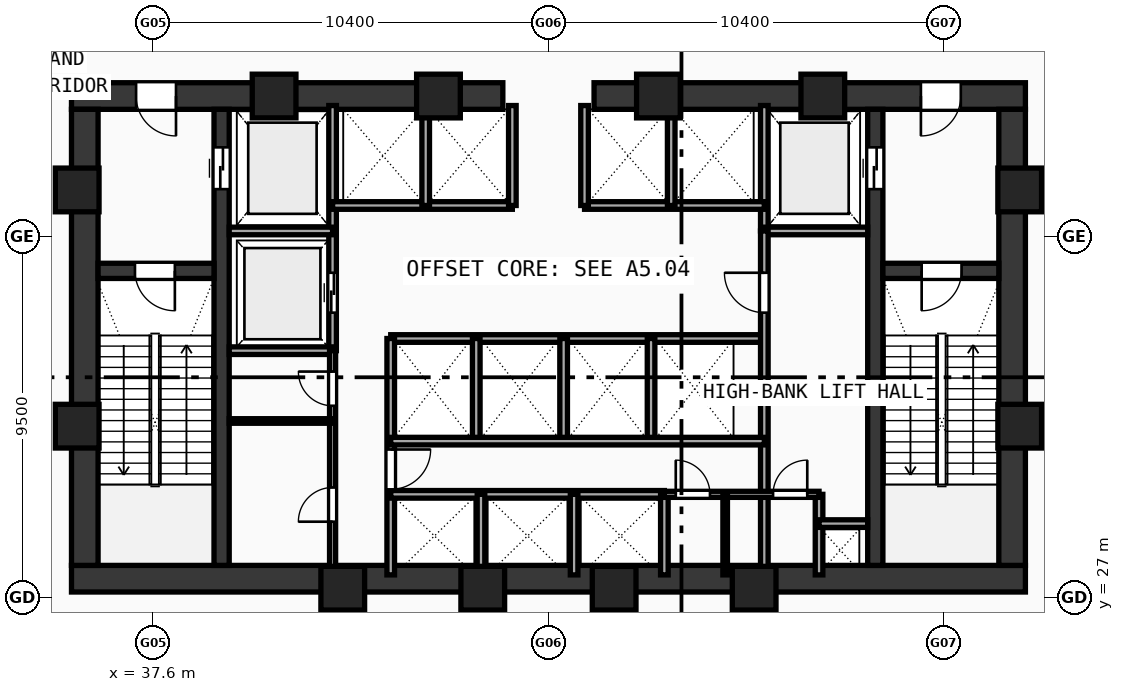
"""IFC4 building model, lengths in metres.
Left out: names, types, materials, properties, quantities, classifications, styles, units other than length and angle.
Written with IfcOpenShell. Run it as: python <this file> out.ifc"""

import sys

from ifc_helpers import new_model, si_unit, direction, frame, frame_2d, origin, origin_with_axes, origin_2d, place, context, subcontext, project, spatial, rectangle, hollow_rectangle, extrude, source, transform, mapped, element, fill, save


model = new_model("IFC4")
c1 = context("Model", 3, precision=1e-05, world=origin(), true_north=direction((0.0, 1.0)))
c2 = subcontext(c1, "Body", "Model", "MODEL_VIEW")
j1 = project(units=[si_unit("LENGTHUNIT", "METRE"), si_unit("PLANEANGLEUNIT", "RADIAN")], contexts=[c1])
p1 = place(None, origin())
s1 = spatial("IfcSite", under=j1, at=p1, CompositionType="ELEMENT")
p2 = place(p1, origin())
s2 = spatial("IfcBuilding", under=s1, at=p2, CompositionType="ELEMENT")
p3 = place(p2, frame((0.0, 0.0, 25.4)))
s3 = spatial("IfcBuildingStorey", under=s2, at=p3, CompositionType="ELEMENT", Elevation=25.4)
p4 = place(p3, frame((35.45, 27.5, 0.0), z_axis=(0.0, 0.0, 1.0), x_axis=(1.0, 0.0, 0.0)))
e1 = element("IfcWall", 1, at=p4, inside=s3, PredefinedType="SHEAR", context=c2, shape_type="SweptSolid", body=[
    extrude(rectangle(XDim=25.1, YDim=0.7, at=frame_2d((12.55, 0.0))), origin(), (0.0, 0.0, 1.0), 4.74),
])
p5 = place(p3, frame((35.45, 40.2, 0.0), z_axis=(0.0, 0.0, 1.0), x_axis=(1.0, 0.0, 0.0)))
e2 = element("IfcWall", 2, at=p5, inside=s3, PredefinedType="SHEAR", context=c2, shape_type="SweptSolid", body=[
    extrude(rectangle(XDim=11.35, YDim=0.7, at=frame_2d((5.675, 0.0))), origin(), (0.0, 0.0, 1.0), 4.74),
])
p6 = place(p5, frame((1.7, 0.0, 0.0)))
e3 = element("IfcOpeningElement", 3, at=p6, cuts=e2, PredefinedType="OPENING", context=c2, shape_type="SweptSolid", body=[
    extrude(rectangle(XDim=1.05, YDim=2.1, at=frame_2d((0.525, 1.05))), frame((0.0, 0.36, 0.0), z_axis=(0.0, -1.0, 0.0), x_axis=(1.0, 0.0, 0.0)), (0.0, 0.0, 1.0), 0.72),
])
p7 = place(p3, frame((49.2, 40.2, 0.0), z_axis=(0.0, 0.0, 1.0), x_axis=(1.0, 0.0, 0.0)))
e4 = element("IfcWall", 4, at=p7, inside=s3, PredefinedType="SHEAR", context=c2, shape_type="SweptSolid", body=[
    extrude(rectangle(XDim=11.35, YDim=0.7, at=frame_2d((5.675, 0.0))), origin(), (0.0, 0.0, 1.0), 4.74),
])
p8 = place(p7, frame((8.6, 0.0, 0.0)))
e5 = element("IfcOpeningElement", 5, at=p8, cuts=e4, PredefinedType="OPENING", context=c2, shape_type="SweptSolid", body=[
    extrude(rectangle(XDim=1.05, YDim=2.1, at=frame_2d((0.525, 1.05))), frame((0.0, 0.36, 0.0), z_axis=(0.0, -1.0, 0.0), x_axis=(1.0, 0.0, 0.0)), (0.0, 0.0, 1.0), 0.72),
])
for number, where, z_axis, x_axis in (
    (6, (35.8, 27.85, 0.0), (0.0, 0.0, 1.0), (0.0, 1.0, 0.0)),
    (7, (60.2, 27.85, 0.0), (0.0, 0.0, 1.0), (0.0, 1.0, 0.0)),
):
    element("IfcWall", number, at=place(p3, frame(where, z_axis=z_axis, x_axis=x_axis)), inside=s3, PredefinedType="SHEAR", context=c2, shape_type="SweptSolid", body=[
        extrude(rectangle(XDim=12.0, YDim=0.7, at=frame_2d((6.0, 0.0))), origin(), (0.0, 0.0, 1.0), 4.74),
    ])
p9 = place(p3, frame((39.4, 27.85, 0.0), z_axis=(0.0, 0.0, 1.0), x_axis=(0.0, 1.0, 0.0)))
e8 = element("IfcWall", 8, at=p9, inside=s3, PredefinedType="SHEAR", context=c2, shape_type="SweptSolid", body=[
    extrude(rectangle(XDim=12.0, YDim=0.4, at=frame_2d((6.0, 0.0))), origin(), (0.0, 0.0, 1.0), 4.74),
])
p10 = place(p9, frame((9.9, 0.0, 0.0)))
e9 = element("IfcOpeningElement", 9, at=p10, cuts=e8, PredefinedType="OPENING", context=c2, shape_type="SweptSolid", body=[
    extrude(rectangle(XDim=1.1, YDim=2.1, at=frame_2d((0.55, 1.05))), frame((0.0, 0.21, 0.0), z_axis=(0.0, -1.0, 0.0), x_axis=(1.0, 0.0, 0.0)), (0.0, 0.0, 1.0), 0.42),
])
p11 = place(p3, frame((56.6, 27.85, 0.0), z_axis=(0.0, 0.0, 1.0), x_axis=(0.0, 1.0, 0.0)))
e10 = element("IfcWall", 10, at=p11, inside=s3, PredefinedType="SHEAR", context=c2, shape_type="SweptSolid", body=[
    extrude(rectangle(XDim=12.0, YDim=0.4, at=frame_2d((6.0, 0.0))), origin(), (0.0, 0.0, 1.0), 4.74),
])
p12 = place(p11, frame((9.9, 0.0, 0.0)))
e11 = element("IfcOpeningElement", 11, at=p12, cuts=e10, PredefinedType="OPENING", context=c2, shape_type="SweptSolid", body=[
    extrude(rectangle(XDim=1.1, YDim=2.1, at=frame_2d((0.55, 1.05))), frame((0.0, 0.21, 0.0), z_axis=(0.0, -1.0, 0.0), x_axis=(1.0, 0.0, 0.0)), (0.0, 0.0, 1.0), 0.42),
])
p13 = place(p3, frame((36.15, 35.6, 0.0), z_axis=(0.0, 0.0, 1.0), x_axis=(1.0, 0.0, 0.0)))
e12 = element("IfcWall", 12, at=p13, inside=s3, PredefinedType="SHEAR", context=c2, shape_type="SweptSolid", body=[
    extrude(rectangle(XDim=3.05, YDim=0.4, at=frame_2d((1.525, 0.0))), origin(), (0.0, 0.0, 1.0), 4.74),
])
p14 = place(p13, frame((0.97, 0.0, 0.0)))
e13 = element("IfcOpeningElement", 13, at=p14, cuts=e12, PredefinedType="OPENING", context=c2, shape_type="SweptSolid", body=[
    extrude(rectangle(XDim=1.05, YDim=2.1, at=frame_2d((0.525, 1.05))), frame((0.0, 0.21, 0.0), z_axis=(0.0, -1.0, 0.0), x_axis=(1.0, 0.0, 0.0)), (0.0, 0.0, 1.0), 0.42),
])
p15 = place(p3, frame((56.8, 35.6, 0.0), z_axis=(0.0, 0.0, 1.0), x_axis=(1.0, 0.0, 0.0)))
e14 = element("IfcWall", 14, at=p15, inside=s3, PredefinedType="SHEAR", context=c2, shape_type="SweptSolid", body=[
    extrude(rectangle(XDim=3.05, YDim=0.4, at=frame_2d((1.525, 0.0))), origin(), (0.0, 0.0, 1.0), 4.74),
])
p16 = place(p15, frame((1.02, 0.0, 0.0)))
e15 = element("IfcOpeningElement", 15, at=p16, cuts=e14, PredefinedType="OPENING", context=c2, shape_type="SweptSolid", body=[
    extrude(rectangle(XDim=1.05, YDim=2.1, at=frame_2d((0.525, 1.05))), frame((0.0, 0.21, 0.0), z_axis=(0.0, -1.0, 0.0), x_axis=(1.0, 0.0, 0.0)), (0.0, 0.0, 1.0), 0.42),
])
m1 = source(origin(), c2, "Body", "SweptSolid", [
    extrude(hollow_rectangle(XDim=1.15, YDim=1.15, WallThickness=0.048, at=origin_2d()), origin(), (0.0, 0.0, 1.0), 5.02),
])
for number, where, z_axis, x_axis in (
    (16, (42.588, 27.25, -0.28), (0.0, 0.0, 1.0), (1.0, 0.0, 0.0)),
    (17, (46.272, 27.25, -0.28), (0.0, 0.0, 1.0), (1.0, 0.0, 0.0)),
    (18, (49.729, 27.25, -0.28), (0.0, 0.0, 1.0), (1.0, 0.0, 0.0)),
    (19, (53.412, 27.25, -0.28), (0.0, 0.0, 1.0), (1.0, 0.0, 0.0)),
    (20, (60.4, 31.513, -0.28), (0.0, 0.0, 1.0), (1.0, 0.0, 0.0)),
    (21, (60.4, 37.729, -0.28), (0.0, 0.0, 1.0), (1.0, 0.0, 0.0)),
    (22, (55.219, 40.2, -0.28), (0.0, 0.0, 1.0), (1.0, 0.0, 0.0)),
    (23, (50.894, 40.2, -0.28), (0.0, 0.0, 1.0), (1.0, 0.0, 0.0)),
    (24, (45.106, 40.2, -0.28), (0.0, 0.0, 1.0), (1.0, 0.0, 0.0)),
    (25, (40.781, 40.2, -0.28), (0.0, 0.0, 1.0), (1.0, 0.0, 0.0)),
    (26, (35.6, 37.729, -0.28), (0.0, 0.0, 1.0), (1.0, 0.0, 0.0)),
    (27, (35.6, 31.513, -0.28), (0.0, 0.0, 1.0), (1.0, 0.0, 0.0)),
):
    element("IfcColumn", number, at=place(p3, frame(where, z_axis=z_axis, x_axis=x_axis)), inside=s3, PredefinedType="COLUMN", context=c2, shape_type="MappedRepresentation", body=[
        mapped(m1, transform((0.0, 0.0, 0.0), scale=1.0)),
    ])
p17 = place(p3, frame((42.32, 33.5, 0.0), z_axis=(0.0, 0.0, 1.0), x_axis=(0.0, 1.0, 0.0)))
e28 = element("IfcWall", 28, at=p17, inside=s3, PredefinedType="SOLIDWALL", context=c2, shape_type="SweptSolid", body=[
    extrude(rectangle(XDim=6.45, YDim=0.2, at=frame_2d((3.225, 0.0))), origin(), (0.0, 0.0, 1.0), 4.74),
])
p18 = place(p17, frame((1.0, 0.0, 0.0)))
e29 = element("IfcOpeningElement", 29, at=p18, cuts=e28, PredefinedType="OPENING", context=c2, shape_type="SweptSolid", body=[
    extrude(rectangle(XDim=1.05, YDim=2.1, at=frame_2d((0.525, 1.05))), frame((0.0, 0.11, 0.0), z_axis=(0.0, -1.0, 0.0), x_axis=(1.0, 0.0, 0.0)), (0.0, 0.0, 1.0), 0.22),
])
for number, where, z_axis, x_axis in (
    (30, (39.6, 36.65, 0.0), (0.0, 0.0, 1.0), (1.0, 0.0, 0.0)),
    (31, (39.6, 33.5, 0.0), (0.0, 0.0, 1.0), (1.0, 0.0, 0.0)),
):
    element("IfcWall", number, at=place(p3, frame(where, z_axis=z_axis, x_axis=x_axis)), inside=s3, PredefinedType="SOLIDWALL", context=c2, shape_type="SweptSolid", body=[
        extrude(rectangle(XDim=2.72, YDim=0.2, at=frame_2d((1.36, 0.0))), origin(), (0.0, 0.0, 1.0), 4.74),
    ])
p19 = place(p3, frame((53.68, 36.65, 0.0), z_axis=(0.0, 0.0, 1.0), x_axis=(0.0, 1.0, 0.0)))
e32 = element("IfcWall", 32, at=p19, inside=s3, PredefinedType="SOLIDWALL", context=c2, shape_type="SweptSolid", body=[
    extrude(rectangle(XDim=3.3, YDim=0.2, at=frame_2d((1.65, 0.0))), origin(), (0.0, 0.0, 1.0), 4.74),
])
p20 = place(p3, frame((53.68, 36.65, 0.0), z_axis=(0.0, 0.0, 1.0), x_axis=(1.0, 0.0, 0.0)))
e33 = element("IfcWall", 33, at=p20, inside=s3, PredefinedType="SOLIDWALL", context=c2, shape_type="SweptSolid", body=[
    extrude(rectangle(XDim=2.72, YDim=0.2, at=frame_2d((1.36, 0.0))), origin(), (0.0, 0.0, 1.0), 4.74),
])
for number, where, z_axis, x_axis in (
    (34, (42.32, 37.32, 0.0), (0.0, 0.0, 1.0), (1.0, 0.0, 0.0)),
    (35, (48.95, 37.32, 0.0), (0.0, 0.0, 1.0), (1.0, 0.0, 0.0)),
):
    element("IfcWall", number, at=place(p3, frame(where, z_axis=z_axis, x_axis=x_axis)), inside=s3, PredefinedType="SOLIDWALL", context=c2, shape_type="SweptSolid", body=[
        extrude(rectangle(XDim=4.73, YDim=0.2, at=frame_2d((2.365, 0.0))), origin(), (0.0, 0.0, 1.0), 4.74),
    ])
for number, where, z_axis, x_axis in (
    (36, (47.05, 37.32, 0.0), (0.0, 0.0, 1.0), (0.0, 1.0, 0.0)),
    (37, (48.95, 37.32, 0.0), (0.0, 0.0, 1.0), (0.0, 1.0, 0.0)),
    (38, (44.77, 37.32, 0.0), (0.0, 0.0, 1.0), (0.0, 1.0, 0.0)),
    (39, (51.23, 37.32, 0.0), (0.0, 0.0, 1.0), (0.0, 1.0, 0.0)),
):
    element("IfcWall", number, at=place(p3, frame(where, z_axis=z_axis, x_axis=x_axis)), inside=s3, PredefinedType="SOLIDWALL", context=c2, shape_type="SweptSolid", body=[
        extrude(rectangle(XDim=2.63, YDim=0.2, at=frame_2d((1.315, 0.0))), origin(), (0.0, 0.0, 1.0), 4.74),
    ])
p21 = place(p3, frame((43.85, 33.82, 0.0), z_axis=(0.0, 0.0, 1.0), x_axis=(1.0, 0.0, 0.0)))
e40 = element("IfcWall", 40, at=p21, inside=s3, PredefinedType="SOLIDWALL", context=c2, shape_type="SweptSolid", body=[
    extrude(rectangle(XDim=9.83, YDim=0.2, at=frame_2d((4.915, 0.0))), origin(), (0.0, 0.0, 1.0), 4.74),
])
p22 = place(p3, frame((43.85, 27.6, 0.0), z_axis=(0.0, 0.0, 1.0), x_axis=(0.0, 1.0, 0.0)))
e41 = element("IfcWall", 41, at=p22, inside=s3, PredefinedType="SOLIDWALL", context=c2, shape_type="SweptSolid", body=[
    extrude(rectangle(XDim=6.22, YDim=0.2, at=frame_2d((3.11, 0.0))), origin(), (0.0, 0.0, 1.0), 4.74),
])
p23 = place(p22, frame((2.25, 0.0, 0.0)))
e42 = element("IfcOpeningElement", 42, at=p23, cuts=e41, PredefinedType="OPENING", context=c2, shape_type="SweptSolid", body=[
    extrude(rectangle(XDim=1.05, YDim=2.1, at=frame_2d((0.525, 1.05))), frame((0.0, 0.11, 0.0), z_axis=(0.0, -1.0, 0.0), x_axis=(1.0, 0.0, 0.0)), (0.0, 0.0, 1.0), 0.22),
])
p24 = place(p3, frame((53.68, 27.6, 0.0), z_axis=(0.0, 0.0, 1.0), x_axis=(0.0, 1.0, 0.0)))
e43 = element("IfcWall", 43, at=p24, inside=s3, PredefinedType="SOLIDWALL", context=c2, shape_type="SweptSolid", body=[
    extrude(rectangle(XDim=9.05, YDim=0.2, at=frame_2d((4.525, 0.0))), origin(), (0.0, 0.0, 1.0), 4.74),
])
p25 = place(p24, frame((6.9, 0.0, 0.0)))
e44 = element("IfcOpeningElement", 44, at=p25, cuts=e43, PredefinedType="OPENING", context=c2, shape_type="SweptSolid", body=[
    extrude(rectangle(XDim=1.05, YDim=2.1, at=frame_2d((0.525, 1.05))), frame((0.0, 0.11, 0.0), z_axis=(0.0, -1.0, 0.0), x_axis=(1.0, 0.0, 0.0)), (0.0, 0.0, 1.0), 0.22),
])
for number, where, z_axis, x_axis in (
    (45, (46.1, 31.12, 0.0), (0.0, 0.0, 1.0), (0.0, 1.0, 0.0)),
    (46, (48.4, 31.12, 0.0), (0.0, 0.0, 1.0), (0.0, 1.0, 0.0)),
    (47, (50.7, 31.12, 0.0), (0.0, 0.0, 1.0), (0.0, 1.0, 0.0)),
):
    element("IfcWall", number, at=place(p3, frame(where, z_axis=z_axis, x_axis=x_axis)), inside=s3, PredefinedType="SOLIDWALL", context=c2, shape_type="SweptSolid", body=[
        extrude(rectangle(XDim=2.7, YDim=0.2, at=frame_2d((1.35, 0.0))), origin(), (0.0, 0.0, 1.0), 4.74),
    ])
p26 = place(p3, frame((43.85, 29.72, 0.0), z_axis=(0.0, 0.0, 1.0), x_axis=(1.0, 0.0, 0.0)))
e48 = element("IfcWall", 48, at=p26, inside=s3, PredefinedType="SOLIDWALL", context=c2, shape_type="SweptSolid", body=[
    extrude(rectangle(XDim=7.2, YDim=0.2, at=frame_2d((3.6, 0.0))), origin(), (0.0, 0.0, 1.0), 4.74),
])
p27 = place(p3, frame((51.05, 27.6, 0.0), z_axis=(0.0, 0.0, 1.0), x_axis=(0.0, 1.0, 0.0)))
e49 = element("IfcWall", 49, at=p27, inside=s3, PredefinedType="SOLIDWALL", context=c2, shape_type="SweptSolid", body=[
    extrude(rectangle(XDim=2.12, YDim=0.2, at=frame_2d((1.06, 0.0))), origin(), (0.0, 0.0, 1.0), 4.74),
])
p28 = place(p3, frame((43.85, 31.12, 0.0), z_axis=(0.0, 0.0, 1.0), x_axis=(1.0, 0.0, 0.0)))
e50 = element("IfcWall", 50, at=p28, inside=s3, PredefinedType="SOLIDWALL", context=c2, shape_type="SweptSolid", body=[
    extrude(rectangle(XDim=9.83, YDim=0.2, at=frame_2d((4.915, 0.0))), origin(), (0.0, 0.0, 1.0), 4.74),
])
for number, where, z_axis, x_axis in (
    (51, (46.225, 27.6, 0.0), (0.0, 0.0, 1.0), (0.0, 1.0, 0.0)),
    (52, (48.675, 27.6, 0.0), (0.0, 0.0, 1.0), (0.0, 1.0, 0.0)),
    (53, (55.12, 27.6, 0.0), (0.0, 0.0, 1.0), (0.0, 1.0, 0.0)),
):
    element("IfcWall", number, at=place(p3, frame(where, z_axis=z_axis, x_axis=x_axis)), inside=s3, PredefinedType="SOLIDWALL", context=c2, shape_type="SweptSolid", body=[
        extrude(rectangle(XDim=2.12, YDim=0.2, at=frame_2d((1.06, 0.0))), origin(), (0.0, 0.0, 1.0), 4.74),
    ])
p29 = place(p3, frame((55.12, 28.95, 0.0), z_axis=(0.0, 0.0, 1.0), x_axis=(1.0, 0.0, 0.0)))
e54 = element("IfcWall", 54, at=p29, inside=s3, PredefinedType="SOLIDWALL", context=c2, shape_type="SweptSolid", body=[
    extrude(rectangle(XDim=1.28, YDim=0.2, at=frame_2d((0.64, 0.0))), origin(), (0.0, 0.0, 1.0), 4.74),
])
p30 = place(p3, frame((42.32, 27.6, 0.0), z_axis=(0.0, 0.0, 1.0), x_axis=(0.0, 1.0, 0.0)))
e55 = element("IfcWall", 55, at=p30, inside=s3, PredefinedType="PARTITIONING", context=c2, shape_type="SweptSolid", body=[
    extrude(rectangle(XDim=5.9, YDim=0.16, at=frame_2d((2.95, 0.0))), origin(), (0.0, 0.0, 1.0), 4.74),
])
p31 = place(p30, frame((1.4, 0.0, 0.0)))
e56 = element("IfcOpeningElement", 56, at=p31, cuts=e55, PredefinedType="OPENING", context=c2, shape_type="SweptSolid", body=[
    extrude(rectangle(XDim=0.9, YDim=2.1, at=frame_2d((0.45, 1.05))), frame((0.0, 0.09, 0.0), z_axis=(0.0, -1.0, 0.0), x_axis=(1.0, 0.0, 0.0)), (0.0, 0.0, 1.0), 0.18),
])
p32 = place(p30, frame((4.45, 0.0, 0.0)))
e57 = element("IfcOpeningElement", 57, at=p32, cuts=e55, PredefinedType="OPENING", context=c2, shape_type="SweptSolid", body=[
    extrude(rectangle(XDim=0.9, YDim=2.1, at=frame_2d((0.45, 1.05))), frame((0.0, 0.09, 0.0), z_axis=(0.0, -1.0, 0.0), x_axis=(1.0, 0.0, 0.0)), (0.0, 0.0, 1.0), 0.18),
])
p33 = place(p3, frame((51.05, 29.72, 0.0), z_axis=(0.0, 0.0, 1.0), x_axis=(1.0, 0.0, 0.0)))
e58 = element("IfcWall", 58, at=p33, inside=s3, PredefinedType="PARTITIONING", context=c2, shape_type="SweptSolid", body=[
    extrude(rectangle(XDim=4.07, YDim=0.16, at=frame_2d((2.035, 0.0))), origin(), (0.0, 0.0, 1.0), 4.74),
])
p34 = place(p33, frame((0.3, 0.0, 0.0)))
e59 = element("IfcOpeningElement", 59, at=p34, cuts=e58, PredefinedType="OPENING", context=c2, shape_type="SweptSolid", body=[
    extrude(rectangle(XDim=0.9, YDim=2.1, at=frame_2d((0.45, 1.05))), frame((0.0, 0.09, 0.0), z_axis=(0.0, -1.0, 0.0), x_axis=(1.0, 0.0, 0.0)), (0.0, 0.0, 1.0), 0.18),
])
p35 = place(p33, frame((2.86, 0.0, 0.0)))
e60 = element("IfcOpeningElement", 60, at=p35, cuts=e58, PredefinedType="OPENING", context=c2, shape_type="SweptSolid", body=[
    extrude(rectangle(XDim=0.9, YDim=2.1, at=frame_2d((0.45, 1.05))), frame((0.0, 0.09, 0.0), z_axis=(0.0, -1.0, 0.0), x_axis=(1.0, 0.0, 0.0)), (0.0, 0.0, 1.0), 0.18),
])
p36 = place(p3, frame((39.6, 31.65, 0.0), z_axis=(0.0, 0.0, 1.0), x_axis=(1.0, 0.0, 0.0)))
e61 = element("IfcWall", 61, at=p36, inside=s3, PredefinedType="PARTITIONING", context=c2, shape_type="SweptSolid", body=[
    extrude(rectangle(XDim=2.72, YDim=0.12, at=frame_2d((1.36, 0.0))), origin(), (0.0, 0.0, 1.0), 4.74),
])
p37 = place(p3, frame((52.65, 27.6, 0.0), z_axis=(0.0, 0.0, 1.0), x_axis=(0.0, 1.0, 0.0)))
e62 = element("IfcWall", 62, at=p37, inside=s3, PredefinedType="PARTITIONING", context=c2, shape_type="SweptSolid", body=[
    extrude(rectangle(XDim=2.12, YDim=0.12, at=frame_2d((1.06, 0.0))), origin(), (0.0, 0.0, 1.0), 4.74),
])
m2 = source(origin(), c2, "Body", "SweptSolid", [
    extrude(rectangle(XDim=1.05, YDim=2.1, at=frame_2d((0.525, 1.05))), frame((0.0, 0.025, 0.0), z_axis=(0.0, -1.0, 0.0), x_axis=(1.0, 0.0, 0.0)), (0.0, 0.0, 1.0), 0.05),
])
p38 = place(p14, frame((1.05, 0.0, 0.0), z_axis=(0.0, 0.0, 1.0), x_axis=(-1.0, 0.0, 0.0)))
e63 = element("IfcDoor", 63, at=p38, inside=s3, OperationType="SINGLE_SWING_LEFT", PredefinedType="DOOR", context=c2, shape_type="MappedRepresentation", body=[
    mapped(m2, transform((0.0, 0.0, 0.0), scale=1.0)),
])
fill(e13, e63)
p39 = place(p16, frame((1.05, 0.0, 0.0), z_axis=(0.0, 0.0, 1.0), x_axis=(-1.0, 0.0, 0.0)))
e64 = element("IfcDoor", 64, at=p39, inside=s3, OperationType="SINGLE_SWING_RIGHT", PredefinedType="DOOR", context=c2, shape_type="MappedRepresentation", body=[
    mapped(m2, transform((0.0, 0.0, 0.0), scale=1.0)),
])
fill(e15, e64)
p40 = place(p6, frame((1.05, 0.0, 0.0), z_axis=(0.0, 0.0, 1.0), x_axis=(-1.0, 0.0, 0.0)))
e65 = element("IfcDoor", 65, at=p40, inside=s3, OperationType="SINGLE_SWING_LEFT", PredefinedType="DOOR", context=c2, shape_type="MappedRepresentation", body=[
    mapped(m2, transform((0.0, 0.0, 0.0), scale=1.0)),
])
fill(e3, e65)
p41 = place(p8, frame((1.05, 0.0, 0.0), z_axis=(0.0, 0.0, 1.0), x_axis=(-1.0, 0.0, 0.0)))
e66 = element("IfcDoor", 66, at=p41, inside=s3, OperationType="SINGLE_SWING_RIGHT", PredefinedType="DOOR", context=c2, shape_type="MappedRepresentation", body=[
    mapped(m2, transform((0.0, 0.0, 0.0), scale=1.0)),
])
fill(e5, e66)
m3 = source(origin(), c2, "Body", "SweptSolid", [
    extrude(rectangle(XDim=1.1, YDim=2.1, at=frame_2d((0.55, 1.05))), frame((0.0, 0.025, 0.0), z_axis=(0.0, -1.0, 0.0), x_axis=(1.0, 0.0, 0.0)), (0.0, 0.0, 1.0), 0.05),
])
p42 = place(p10, frame((1.1, 0.0, 0.0), z_axis=(0.0, 0.0, 1.0), x_axis=(-1.0, 0.0, 0.0)))
e67 = element("IfcDoor", 67, at=p42, inside=s3, OperationType="DOUBLE_DOOR_SLIDING", PredefinedType="DOOR", context=c2, shape_type="MappedRepresentation", body=[
    mapped(m3, transform((0.0, 0.0, 0.0), scale=1.0)),
])
fill(e9, e67)
p43 = place(p12, origin_with_axes())
e68 = element("IfcDoor", 68, at=p43, inside=s3, OperationType="DOUBLE_DOOR_SLIDING", PredefinedType="DOOR", context=c2, shape_type="MappedRepresentation", body=[
    mapped(m3, transform((0.0, 0.0, 0.0), scale=1.0)),
])
fill(e11, e68)
p44 = place(p18, origin_with_axes())
e69 = element("IfcDoor", 69, at=p44, inside=s3, OperationType="DOUBLE_DOOR_SLIDING", PredefinedType="DOOR", context=c2, shape_type="MappedRepresentation", body=[
    mapped(m2, transform((0.0, 0.0, 0.0), scale=1.0)),
])
fill(e29, e69)
p45 = place(p23, frame((1.05, 0.0, 0.0), z_axis=(0.0, 0.0, 1.0), x_axis=(-1.0, 0.0, 0.0)))
e70 = element("IfcDoor", 70, at=p45, inside=s3, OperationType="SINGLE_SWING_LEFT", PredefinedType="DOOR", context=c2, shape_type="MappedRepresentation", body=[
    mapped(m2, transform((0.0, 0.0, 0.0), scale=1.0)),
])
fill(e42, e70)
p46 = place(p25, origin_with_axes())
e71 = element("IfcDoor", 71, at=p46, inside=s3, OperationType="SINGLE_SWING_RIGHT", PredefinedType="DOOR", context=c2, shape_type="MappedRepresentation", body=[
    mapped(m2, transform((0.0, 0.0, 0.0), scale=1.0)),
])
fill(e44, e71)
m4 = source(origin(), c2, "Body", "SweptSolid", [
    extrude(rectangle(XDim=0.9, YDim=2.1, at=frame_2d((0.45, 1.05))), frame((0.0, 0.025, 0.0), z_axis=(0.0, -1.0, 0.0), x_axis=(1.0, 0.0, 0.0)), (0.0, 0.0, 1.0), 0.05),
])
p47 = place(p31, origin_with_axes())
e72 = element("IfcDoor", 72, at=p47, inside=s3, OperationType="SINGLE_SWING_LEFT", PredefinedType="DOOR", context=c2, shape_type="MappedRepresentation", body=[
    mapped(m4, transform((0.0, 0.0, 0.0), scale=1.0)),
])
fill(e56, e72)
p48 = place(p32, origin_with_axes())
e73 = element("IfcDoor", 73, at=p48, inside=s3, OperationType="SINGLE_SWING_RIGHT", PredefinedType="DOOR", context=c2, shape_type="MappedRepresentation", body=[
    mapped(m4, transform((0.0, 0.0, 0.0), scale=1.0)),
])
fill(e57, e73)
p49 = place(p34, origin_with_axes())
e74 = element("IfcDoor", 74, at=p49, inside=s3, OperationType="SINGLE_SWING_LEFT", PredefinedType="DOOR", context=c2, shape_type="MappedRepresentation", body=[
    mapped(m4, transform((0.0, 0.0, 0.0), scale=1.0)),
])
fill(e59, e74)
p50 = place(p35, origin_with_axes())
e75 = element("IfcDoor", 75, at=p50, inside=s3, OperationType="SINGLE_SWING_RIGHT", PredefinedType="DOOR", context=c2, shape_type="MappedRepresentation", body=[
    mapped(m4, transform((0.0, 0.0, 0.0), scale=1.0)),
])
fill(e60, e75)
save(model, sys.argv[1])
